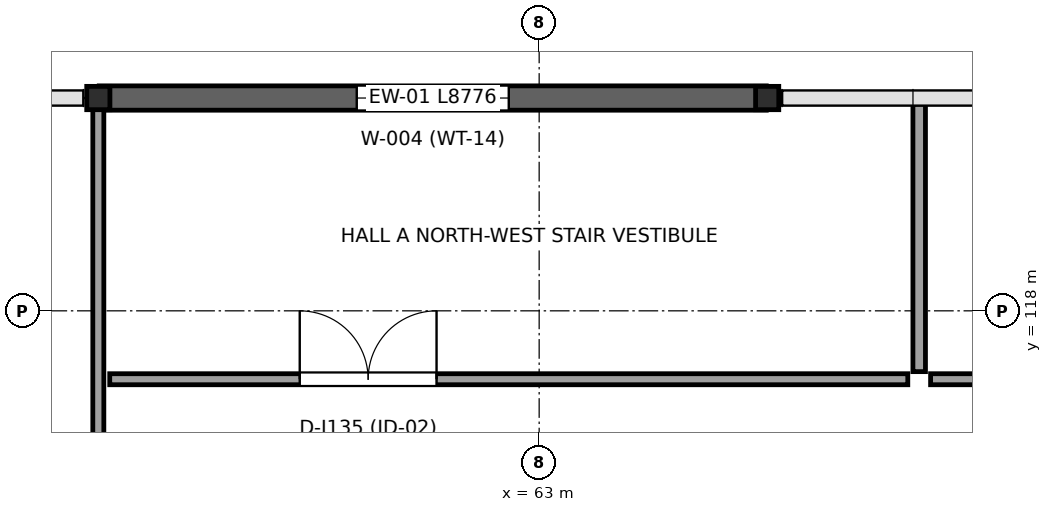
"""IFC4 building model, lengths in metres.
Left out: names, types, materials, properties, quantities, classifications, styles, units other than length and angle.
Written with IfcOpenShell. Run it as: python <this file> out.ifc"""

import sys

from ifc_helpers import new_model, si_unit, direction, frame, frame_2d, origin, origin_2d, place, context, subcontext, project, spatial, rectangle, i_section, extrude, element, fill, save


model = new_model("IFC4")
c1 = context("Model", 3, precision=1e-05, world=origin(), true_north=direction((0.0, 1.0)))
c2 = subcontext(c1, "Body", "Model", "MODEL_VIEW")
j1 = project(units=[si_unit("LENGTHUNIT", "METRE"), si_unit("PLANEANGLEUNIT", "RADIAN")], contexts=[c1])
p1 = place(None, origin())
s1 = spatial("IfcSite", under=j1, at=p1, CompositionType="ELEMENT")
p2 = place(p1, origin())
s2 = spatial("IfcBuilding", under=s1, at=p2, CompositionType="ELEMENT")
p3 = place(p2, frame((0.0, 0.0, 6.0)))
s3 = spatial("IfcBuildingStorey", under=s2, at=p3, CompositionType="ELEMENT", Elevation=6.0)
for number, where, z_axis, x_axis in (
    (1, (57.2, 120.8, 0.0), (0.0, 0.0, 1.0), (1.0, 0.0, 0.0)),
    (2, (66.0, 120.8, 0.0), (0.0, 0.0, 1.0), (1.0, 0.0, 0.0)),
):
    element("IfcColumn", number, at=place(p3, frame(where, z_axis=z_axis, x_axis=x_axis)), inside=s3, PredefinedType="COLUMN", context=c2, shape_type="SweptSolid", body=[
        extrude(i_section(OverallWidth=0.305, OverallDepth=0.307, WebThickness=0.01, FlangeThickness=0.015, at=origin_2d()), origin(), (0.0, 0.0, 1.0), 6.0),
    ])
p4 = place(p3, frame((57.212, 120.8, 0.0), z_axis=(0.0, 0.0, 1.0), x_axis=(1.0, 0.0, 0.0)))
e3 = element("IfcWall", 3, at=p4, inside=s3, PredefinedType="STANDARD", context=c2, shape_type="SweptSolid", body=[
    extrude(rectangle(XDim=8.776, YDim=0.32, at=frame_2d((4.388, 0.0))), origin(), (0.0, 0.0, 1.0), 5.78),
])
p5 = place(p4, frame((3.388, 0.0, 1.1)))
e4 = element("IfcOpeningElement", 4, at=p5, cuts=e3, PredefinedType="OPENING", context=c2, shape_type="SweptSolid", body=[
    extrude(rectangle(XDim=2.0, YDim=2.15, at=frame_2d((1.0, 1.075))), frame((0.0, 0.17, 0.0), z_axis=(0.0, -1.0, 0.0), x_axis=(1.0, 0.0, 0.0)), (0.0, 0.0, 1.0), 0.34),
])
p6 = place(p3, frame((57.35, 117.1, 0.0), z_axis=(0.0, 0.0, 1.0), x_axis=(1.0, 0.0, 0.0)))
e5 = element("IfcWall", 5, at=p6, inside=s3, PredefinedType="PARTITIONING", context=c2, shape_type="SweptSolid", body=[
    extrude(rectangle(XDim=10.5, YDim=0.145, at=frame_2d((5.25, 0.0))), origin(), (0.0, 0.0, 1.0), 4.55),
])
p7 = place(p6, frame((2.5, 0.0, 0.0)))
e6 = element("IfcOpeningElement", 6, at=p7, cuts=e5, PredefinedType="OPENING", context=c2, shape_type="SweptSolid", body=[
    extrude(rectangle(XDim=1.8, YDim=2.3, at=frame_2d((0.9, 1.15))), frame((0.0, 0.083, 0.0), z_axis=(0.0, -1.0, 0.0), x_axis=(1.0, 0.0, 0.0)), (0.0, 0.0, 1.0), 0.165),
])
p8 = place(p3, frame((68.15, 117.1, 0.0), z_axis=(0.0, 0.0, 1.0), x_axis=(1.0, 0.0, 0.0)))
e7 = element("IfcWall", 7, at=p8, inside=s3, PredefinedType="PARTITIONING", context=c2, shape_type="SweptSolid", body=[
    extrude(rectangle(XDim=17.3, YDim=0.145, at=frame_2d((8.65, 0.0))), origin(), (0.0, 0.0, 1.0), 4.55),
])
p9 = place(p8, frame((2.5, 0.0, 0.0)))
e8 = element("IfcOpeningElement", 8, at=p9, cuts=e7, PredefinedType="OPENING", context=c2, shape_type="SweptSolid", body=[
    extrude(rectangle(XDim=1.8, YDim=2.3, at=frame_2d((0.9, 1.15))), frame((0.0, 0.083, 0.0), z_axis=(0.0, -1.0, 0.0), x_axis=(1.0, 0.0, 0.0)), (0.0, 0.0, 1.0), 0.165),
])
p10 = place(p3, frame((68.0, 117.2, 0.0), z_axis=(0.0, 0.0, 1.0), x_axis=(0.0, 1.0, 0.0)))
e9 = element("IfcWall", 9, at=p10, inside=s3, PredefinedType="PARTITIONING", context=c2, shape_type="SweptSolid", body=[
    extrude(rectangle(XDim=3.52, YDim=0.165, at=frame_2d((1.76, 0.0))), origin(), (0.0, 0.0, 1.0), 4.55),
])
p11 = place(p3, frame((57.2, 111.948, 0.0), z_axis=(0.0, 0.0, 1.0), x_axis=(0.0, 1.0, 0.0)))
e10 = element("IfcWall", 10, at=p11, inside=s3, PredefinedType="PARTITIONING", context=c2, shape_type="SweptSolid", body=[
    extrude(rectangle(XDim=8.704, YDim=0.145, at=frame_2d((4.352, 0.0))), origin(), (0.0, 0.0, 1.0), 4.55),
])
p12 = place(p5, origin())
e11 = element("IfcWindow", 11, at=p12, inside=s3, PartitioningType="SINGLE_PANEL", PredefinedType="WINDOW", context=c2, shape_type="SweptSolid", body=[
    extrude(rectangle(XDim=2.0, YDim=2.15, at=frame_2d((1.0, 1.075))), frame((0.0, 0.03, 0.0), z_axis=(0.0, -1.0, 0.0), x_axis=(1.0, 0.0, 0.0)), (0.0, 0.0, 1.0), 0.06),
])
fill(e4, e11)
p13 = place(p7, origin())
e12 = element("IfcDoor", 12, at=p13, inside=s3, OperationType="DOUBLE_DOOR_SINGLE_SWING", PredefinedType="DOOR", context=c2, shape_type="SweptSolid", body=[
    extrude(rectangle(XDim=1.8, YDim=2.3, at=frame_2d((0.9, 1.15))), frame((0.0, 0.025, 0.0), z_axis=(0.0, -1.0, 0.0), x_axis=(1.0, 0.0, 0.0)), (0.0, 0.0, 1.0), 0.05),
])
fill(e6, e12)
save(model, sys.argv[1])
